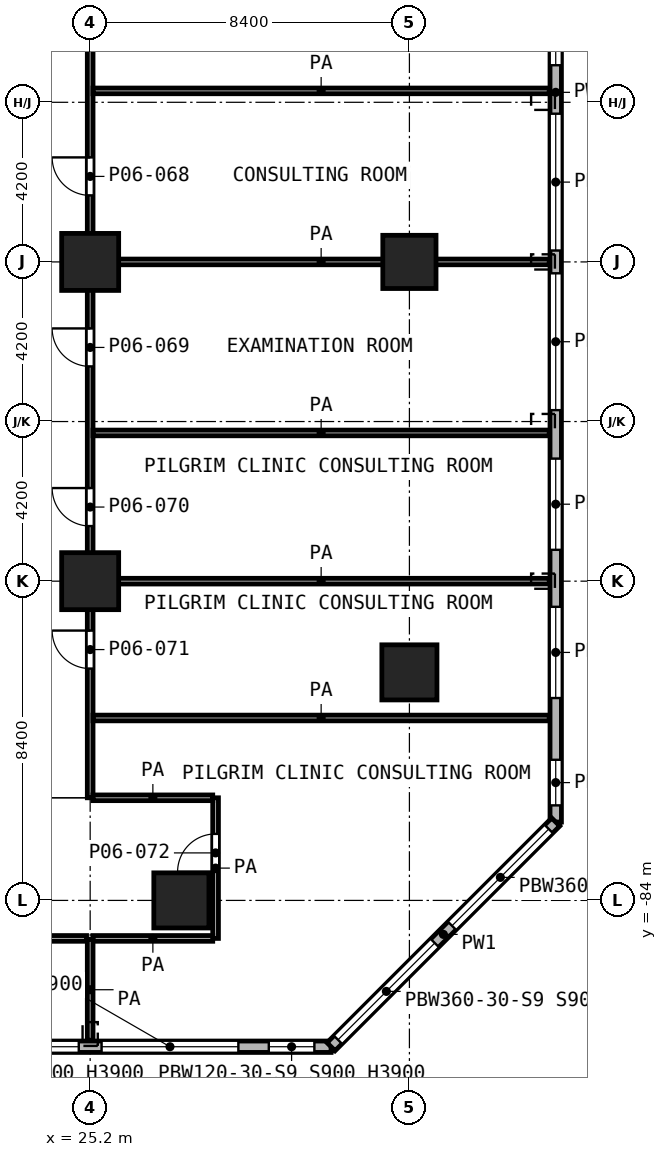
"""IFC4 building model, lengths in metres.
Left out: names, types, materials, properties, quantities, classifications, styles, units other than length and angle.
Written with IfcOpenShell. Run it as: python <this file> out.ifc"""

import sys

from ifc_helpers import new_model, si_unit, direction, frame, frame_2d, origin, origin_2d, place, context, subcontext, project, spatial, rectangle, extrude, element, fill, save


model = new_model("IFC4")
c1 = context("Model", 3, precision=1e-05, world=origin(), true_north=direction((0.0, 1.0)))
c2 = subcontext(c1, "Body", "Model", "MODEL_VIEW")
j1 = project(units=[si_unit("LENGTHUNIT", "METRE"), si_unit("PLANEANGLEUNIT", "RADIAN")], contexts=[c1])
p1 = place(None, origin())
s1 = spatial("IfcSite", under=j1, at=p1, CompositionType="ELEMENT")
p2 = place(p1, origin())
s2 = spatial("IfcBuilding", under=s1, at=p2, CompositionType="ELEMENT")
p3 = place(p2, frame((0.0, 0.0, 29.0)))
s3 = spatial("IfcBuildingStorey", under=s2, at=p3, CompositionType="ELEMENT", Elevation=29.0)
p4 = place(p3, frame((25.2, -67.2, 0.0), z_axis=(0.0, 0.0, 1.0), x_axis=(1.0, 0.0, 0.0)))
e1 = element("IfcColumn", 1, at=p4, inside=s3, PredefinedType="COLUMN", context=c2, shape_type="SweptSolid", body=[
    extrude(rectangle(XDim=1.5, YDim=1.5, at=origin_2d()), origin(), (0.0, 0.0, 1.0), 5.2),
])
p5 = place(p3, frame((33.6, -67.2, 0.0), z_axis=(0.0, 0.0, 1.0), x_axis=(1.0, 0.0, 0.0)))
e2 = element("IfcColumn", 2, at=p5, inside=s3, PredefinedType="COLUMN", context=c2, shape_type="SweptSolid", body=[
    extrude(rectangle(XDim=1.4, YDim=1.4, at=origin_2d()), origin(), (0.0, 0.0, 1.0), 5.2),
])
p6 = place(p3, frame((25.2, -75.6, 0.0), z_axis=(0.0, 0.0, 1.0), x_axis=(1.0, 0.0, 0.0)))
e3 = element("IfcColumn", 3, at=p6, inside=s3, PredefinedType="COLUMN", context=c2, shape_type="SweptSolid", body=[
    extrude(rectangle(XDim=1.5, YDim=1.5, at=origin_2d()), origin(), (0.0, 0.0, 1.0), 5.2),
])
for number, where, z_axis, x_axis in (
    (4, (33.6, -78.0, 0.0), (0.0, 0.0, 1.0), (1.0, 0.0, 0.0)),
    (5, (27.6, -84.0, 0.0), (0.0, 0.0, 1.0), (1.0, 0.0, 0.0)),
):
    element("IfcColumn", number, at=place(p3, frame(where, z_axis=z_axis, x_axis=x_axis)), inside=s3, PredefinedType="COLUMN", context=c2, shape_type="SweptSolid", body=[
        extrude(rectangle(XDim=1.45, YDim=1.45, at=origin_2d()), origin(), (0.0, 0.0, 1.0), 5.2),
    ])
p7 = place(p3, frame((2.062, -87.85, 0.0), z_axis=(0.0, 0.0, 1.0), x_axis=(1.0, 0.0, 0.0)))
e6 = element("IfcWall", 6, at=p7, inside=s3, PredefinedType="SOLIDWALL", context=c2, shape_type="SweptSolid", body=[
    extrude(rectangle(XDim=29.476, YDim=0.3, at=frame_2d((14.738, 0.0))), origin(), (0.0, 0.0, 1.0), 4.7),
])
p8 = place(p7, frame((0.438, 0.0, 0.9)))
e7 = element("IfcOpeningElement", 7, at=p8, cuts=e6, PredefinedType="OPENING", context=c2, shape_type="SweptSolid", body=[
    extrude(rectangle(XDim=1.2, YDim=3.0, at=frame_2d((0.6, 1.5))), frame((0.0, 0.16, 0.0), z_axis=(0.0, -1.0, 0.0), x_axis=(1.0, 0.0, 0.0)), (0.0, 0.0, 1.0), 0.32),
])
p9 = place(p7, frame((2.438, 0.0, 0.9)))
e8 = element("IfcOpeningElement", 8, at=p9, cuts=e6, PredefinedType="OPENING", context=c2, shape_type="SweptSolid", body=[
    extrude(rectangle(XDim=3.6, YDim=3.0, at=frame_2d((1.8, 1.5))), frame((0.0, 0.16, 0.0), z_axis=(0.0, -1.0, 0.0), x_axis=(1.0, 0.0, 0.0)), (0.0, 0.0, 1.0), 0.32),
])
p10 = place(p7, frame((7.163, 0.0, 0.9)))
e9 = element("IfcOpeningElement", 9, at=p10, cuts=e6, PredefinedType="OPENING", context=c2, shape_type="SweptSolid", body=[
    extrude(rectangle(XDim=1.2, YDim=3.0, at=frame_2d((0.6, 1.5))), frame((0.0, 0.16, 0.0), z_axis=(0.0, -1.0, 0.0), x_axis=(1.0, 0.0, 0.0)), (0.0, 0.0, 1.0), 0.32),
])
p11 = place(p7, frame((10.838, 0.0, 0.9)))
e10 = element("IfcOpeningElement", 10, at=p11, cuts=e6, PredefinedType="OPENING", context=c2, shape_type="SweptSolid", body=[
    extrude(rectangle(XDim=3.6, YDim=3.0, at=frame_2d((1.8, 1.5))), frame((0.0, 0.16, 0.0), z_axis=(0.0, -1.0, 0.0), x_axis=(1.0, 0.0, 0.0)), (0.0, 0.0, 1.0), 0.32),
])
p12 = place(p7, frame((15.038, 0.0, 0.9)))
e11 = element("IfcOpeningElement", 11, at=p12, cuts=e6, PredefinedType="OPENING", context=c2, shape_type="SweptSolid", body=[
    extrude(rectangle(XDim=3.6, YDim=3.0, at=frame_2d((1.8, 1.5))), frame((0.0, 0.16, 0.0), z_axis=(0.0, -1.0, 0.0), x_axis=(1.0, 0.0, 0.0)), (0.0, 0.0, 1.0), 0.32),
])
p13 = place(p7, frame((19.238, 0.0, 0.9)))
e12 = element("IfcOpeningElement", 12, at=p13, cuts=e6, PredefinedType="OPENING", context=c2, shape_type="SweptSolid", body=[
    extrude(rectangle(XDim=3.6, YDim=3.0, at=frame_2d((1.8, 1.5))), frame((0.0, 0.16, 0.0), z_axis=(0.0, -1.0, 0.0), x_axis=(1.0, 0.0, 0.0)), (0.0, 0.0, 1.0), 0.32),
])
p14 = place(p7, frame((23.438, 0.0, 0.9)))
e13 = element("IfcOpeningElement", 13, at=p14, cuts=e6, PredefinedType="OPENING", context=c2, shape_type="SweptSolid", body=[
    extrude(rectangle(XDim=3.6, YDim=3.0, at=frame_2d((1.8, 1.5))), frame((0.0, 0.16, 0.0), z_axis=(0.0, -1.0, 0.0), x_axis=(1.0, 0.0, 0.0)), (0.0, 0.0, 1.0), 0.32),
])
p15 = place(p7, frame((27.838, 0.0, 0.9)))
e14 = element("IfcOpeningElement", 14, at=p15, cuts=e6, PredefinedType="OPENING", context=c2, shape_type="SweptSolid", body=[
    extrude(rectangle(XDim=1.2, YDim=3.0, at=frame_2d((0.6, 1.5))), frame((0.0, 0.16, 0.0), z_axis=(0.0, -1.0, 0.0), x_axis=(1.0, 0.0, 0.0)), (0.0, 0.0, 1.0), 0.32),
])
p16 = place(p3, frame((31.538, -87.85, 0.0), z_axis=(0.0, 0.0, 1.0), x_axis=(0.707106781187, 0.707106781187, 0.0)))
e15 = element("IfcWall", 15, at=p16, inside=s3, PredefinedType="SOLIDWALL", context=c2, shape_type="SweptSolid", body=[
    extrude(rectangle(XDim=8.361, YDim=0.3, at=frame_2d((4.181, 0.0))), origin(), (0.0, 0.0, 1.0), 4.7),
])
p17 = place(p16, frame((0.259, 0.0, 0.9)))
e16 = element("IfcOpeningElement", 16, at=p17, cuts=e15, PredefinedType="OPENING", context=c2, shape_type="SweptSolid", body=[
    extrude(rectangle(XDim=3.6, YDim=3.0, at=frame_2d((1.8, 1.5))), frame((0.0, 0.16, 0.0), z_axis=(0.0, -1.0, 0.0), x_axis=(1.0, 0.0, 0.0)), (0.0, 0.0, 1.0), 0.32),
])
p18 = place(p16, frame((4.502, 0.0, 0.9)))
e17 = element("IfcOpeningElement", 17, at=p18, cuts=e15, PredefinedType="OPENING", context=c2, shape_type="SweptSolid", body=[
    extrude(rectangle(XDim=3.6, YDim=3.0, at=frame_2d((1.8, 1.5))), frame((0.0, 0.16, 0.0), z_axis=(0.0, -1.0, 0.0), x_axis=(1.0, 0.0, 0.0)), (0.0, 0.0, 1.0), 0.32),
])
p19 = place(p3, frame((37.45, -81.938, 0.0), z_axis=(0.0, 0.0, 1.0), x_axis=(0.0, 1.0, 0.0)))
e18 = element("IfcWall", 18, at=p19, inside=s3, PredefinedType="SOLIDWALL", context=c2, shape_type="SweptSolid", body=[
    extrude(rectangle(XDim=38.4, YDim=0.3, at=frame_2d((19.2, 0.0))), origin(), (0.0, 0.0, 1.0), 4.7),
])
p20 = place(p19, frame((0.438, 0.0, 0.9)))
e19 = element("IfcOpeningElement", 19, at=p20, cuts=e18, PredefinedType="OPENING", context=c2, shape_type="SweptSolid", body=[
    extrude(rectangle(XDim=1.2, YDim=3.0, at=frame_2d((0.6, 1.5))), frame((0.0, 0.16, 0.0), z_axis=(0.0, -1.0, 0.0), x_axis=(1.0, 0.0, 0.0)), (0.0, 0.0, 1.0), 0.32),
])
p21 = place(p19, frame((3.263, 0.0, 0.9)))
e20 = element("IfcOpeningElement", 20, at=p21, cuts=e18, PredefinedType="OPENING", context=c2, shape_type="SweptSolid", body=[
    extrude(rectangle(XDim=2.4, YDim=3.0, at=frame_2d((1.2, 1.5))), frame((0.0, 0.16, 0.0), z_axis=(0.0, -1.0, 0.0), x_axis=(1.0, 0.0, 0.0)), (0.0, 0.0, 1.0), 0.32),
])
p22 = place(p19, frame((7.163, 0.0, 0.9)))
e21 = element("IfcOpeningElement", 21, at=p22, cuts=e18, PredefinedType="OPENING", context=c2, shape_type="SweptSolid", body=[
    extrude(rectangle(XDim=2.4, YDim=3.0, at=frame_2d((1.2, 1.5))), frame((0.0, 0.16, 0.0), z_axis=(0.0, -1.0, 0.0), x_axis=(1.0, 0.0, 0.0)), (0.0, 0.0, 1.0), 0.32),
])
p23 = place(p19, frame((10.838, 0.0, 0.9)))
e22 = element("IfcOpeningElement", 22, at=p23, cuts=e18, PredefinedType="OPENING", context=c2, shape_type="SweptSolid", body=[
    extrude(rectangle(XDim=3.6, YDim=3.0, at=frame_2d((1.8, 1.5))), frame((0.0, 0.16, 0.0), z_axis=(0.0, -1.0, 0.0), x_axis=(1.0, 0.0, 0.0)), (0.0, 0.0, 1.0), 0.32),
])
p24 = place(p19, frame((15.038, 0.0, 0.9)))
e23 = element("IfcOpeningElement", 23, at=p24, cuts=e18, PredefinedType="OPENING", context=c2, shape_type="SweptSolid", body=[
    extrude(rectangle(XDim=3.6, YDim=3.0, at=frame_2d((1.8, 1.5))), frame((0.0, 0.16, 0.0), z_axis=(0.0, -1.0, 0.0), x_axis=(1.0, 0.0, 0.0)), (0.0, 0.0, 1.0), 0.32),
])
p25 = place(p19, frame((19.913, 0.0, 0.9)))
e24 = element("IfcOpeningElement", 24, at=p25, cuts=e18, PredefinedType="OPENING", context=c2, shape_type="SweptSolid", body=[
    extrude(rectangle(XDim=2.4, YDim=3.0, at=frame_2d((1.2, 1.5))), frame((0.0, 0.16, 0.0), z_axis=(0.0, -1.0, 0.0), x_axis=(1.0, 0.0, 0.0)), (0.0, 0.0, 1.0), 0.32),
])
p26 = place(p19, frame((23.813, 0.0, 0.9)))
e25 = element("IfcOpeningElement", 25, at=p26, cuts=e18, PredefinedType="OPENING", context=c2, shape_type="SweptSolid", body=[
    extrude(rectangle(XDim=2.4, YDim=3.0, at=frame_2d((1.2, 1.5))), frame((0.0, 0.16, 0.0), z_axis=(0.0, -1.0, 0.0), x_axis=(1.0, 0.0, 0.0)), (0.0, 0.0, 1.0), 0.32),
])
p27 = place(p19, frame((27.638, 0.0, 0.9)))
e26 = element("IfcOpeningElement", 26, at=p27, cuts=e18, PredefinedType="OPENING", context=c2, shape_type="SweptSolid", body=[
    extrude(rectangle(XDim=3.6, YDim=3.0, at=frame_2d((1.8, 1.5))), frame((0.0, 0.16, 0.0), z_axis=(0.0, -1.0, 0.0), x_axis=(1.0, 0.0, 0.0)), (0.0, 0.0, 1.0), 0.32),
])
p28 = place(p19, frame((31.838, 0.0, 0.9)))
e27 = element("IfcOpeningElement", 27, at=p28, cuts=e18, PredefinedType="OPENING", context=c2, shape_type="SweptSolid", body=[
    extrude(rectangle(XDim=3.6, YDim=3.0, at=frame_2d((1.8, 1.5))), frame((0.0, 0.16, 0.0), z_axis=(0.0, -1.0, 0.0), x_axis=(1.0, 0.0, 0.0)), (0.0, 0.0, 1.0), 0.32),
])
p29 = place(p19, frame((36.438, 0.0, 0.9)))
e28 = element("IfcOpeningElement", 28, at=p29, cuts=e18, PredefinedType="OPENING", context=c2, shape_type="SweptSolid", body=[
    extrude(rectangle(XDim=1.2, YDim=3.0, at=frame_2d((0.6, 1.5))), frame((0.0, 0.16, 0.0), z_axis=(0.0, -1.0, 0.0), x_axis=(1.0, 0.0, 0.0)), (0.0, 0.0, 1.0), 0.32),
])
p30 = place(p3, frame((11.195, -85.0, 0.0), z_axis=(0.0, 0.0, 1.0), x_axis=(1.0, 0.0, 0.0)))
e29 = element("IfcWall", 29, at=p30, inside=s3, PredefinedType="PARTITIONING", context=c2, shape_type="SweptSolid", body=[
    extrude(rectangle(XDim=13.91, YDim=0.15, at=frame_2d((6.955, 0.0))), origin(), (0.0, 0.0, 1.0), 4.7),
])
p31 = place(p30, frame((6.455, 0.0, 0.0)))
e30 = element("IfcOpeningElement", 30, at=p31, cuts=e29, PredefinedType="OPENING", context=c2, shape_type="SweptSolid", body=[
    extrude(rectangle(XDim=1.0, YDim=2.1, at=frame_2d((0.5, 1.05))), frame((0.0, 0.085, 0.0), z_axis=(0.0, -1.0, 0.0), x_axis=(1.0, 0.0, 0.0)), (0.0, 0.0, 1.0), 0.17),
])
for number, where, z_axis, x_axis in (
    (31, (25.275, -85.0, 0.0), (0.0, 0.0, 1.0), (1.0, 0.0, 0.0)),
    (32, (25.275, -81.3, 0.0), (0.0, 0.0, 1.0), (1.0, 0.0, 0.0)),
):
    element("IfcWall", number, at=place(p3, frame(where, z_axis=z_axis, x_axis=x_axis)), inside=s3, PredefinedType="PARTITIONING", context=c2, shape_type="SweptSolid", body=[
        extrude(rectangle(XDim=3.15, YDim=0.15, at=frame_2d((1.575, 0.0))), origin(), (0.0, 0.0, 1.0), 4.7),
    ])
for number, where, z_axis, x_axis in (
    (33, (25.275, -79.2, 0.0), (0.0, 0.0, 1.0), (1.0, 0.0, 0.0)),
    (34, (25.275, -75.6, 0.0), (0.0, 0.0, 1.0), (1.0, 0.0, 0.0)),
    (35, (25.275, -71.7, 0.0), (0.0, 0.0, 1.0), (1.0, 0.0, 0.0)),
    (36, (25.275, -67.2, 0.0), (0.0, 0.0, 1.0), (1.0, 0.0, 0.0)),
    (37, (25.275, -62.7, 0.0), (0.0, 0.0, 1.0), (1.0, 0.0, 0.0)),
):
    element("IfcWall", number, at=place(p3, frame(where, z_axis=z_axis, x_axis=x_axis)), inside=s3, PredefinedType="PARTITIONING", context=c2, shape_type="SweptSolid", body=[
        extrude(rectangle(XDim=12.005, YDim=0.15, at=frame_2d((6.002, 0.0))), origin(), (0.0, 0.0, 1.0), 4.7),
    ])
p32 = place(p3, frame((25.2, -87.68, 0.0), z_axis=(0.0, 0.0, 1.0), x_axis=(0.0, 1.0, 0.0)))
e38 = element("IfcWall", 38, at=p32, inside=s3, PredefinedType="PARTITIONING", context=c2, shape_type="SweptSolid", body=[
    extrude(rectangle(XDim=2.66, YDim=0.15, at=frame_2d((1.33, 0.0))), origin(), (0.0, 0.0, 1.0), 4.7),
])
p33 = place(p3, frame((25.2, -81.3, 0.0), z_axis=(0.0, 0.0, 1.0), x_axis=(0.0, 1.0, 0.0)))
e39 = element("IfcWall", 39, at=p33, inside=s3, PredefinedType="PARTITIONING", context=c2, shape_type="SweptSolid", body=[
    extrude(rectangle(XDim=46.95, YDim=0.15, at=frame_2d((23.475, 0.0))), origin(), (0.0, 0.0, 1.0), 4.7),
])
p34 = place(p33, frame((35.55, 0.0, 0.0)))
e40 = element("IfcOpeningElement", 40, at=p34, cuts=e39, PredefinedType="OPENING", context=c2, shape_type="SweptSolid", body=[
    extrude(rectangle(XDim=1.5, YDim=2.1, at=frame_2d((0.75, 1.05))), frame((0.0, 0.085, 0.0), z_axis=(0.0, -1.0, 0.0), x_axis=(1.0, 0.0, 0.0)), (0.0, 0.0, 1.0), 0.17),
])
p35 = place(p33, frame((28.0, 0.0, 0.0)))
e41 = element("IfcOpeningElement", 41, at=p35, cuts=e39, PredefinedType="OPENING", context=c2, shape_type="SweptSolid", body=[
    extrude(rectangle(XDim=1.0, YDim=2.1, at=frame_2d((0.5, 1.05))), frame((0.0, 0.085, 0.0), z_axis=(0.0, -1.0, 0.0), x_axis=(1.0, 0.0, 0.0)), (0.0, 0.0, 1.0), 0.17),
])
p36 = place(p33, frame((23.8, 0.0, 0.0)))
e42 = element("IfcOpeningElement", 42, at=p36, cuts=e39, PredefinedType="OPENING", context=c2, shape_type="SweptSolid", body=[
    extrude(rectangle(XDim=1.0, YDim=2.1, at=frame_2d((0.5, 1.05))), frame((0.0, 0.085, 0.0), z_axis=(0.0, -1.0, 0.0), x_axis=(1.0, 0.0, 0.0)), (0.0, 0.0, 1.0), 0.17),
])
p37 = place(p33, frame((20.05, 0.0, 0.0)))
e43 = element("IfcOpeningElement", 43, at=p37, cuts=e39, PredefinedType="OPENING", context=c2, shape_type="SweptSolid", body=[
    extrude(rectangle(XDim=1.0, YDim=2.1, at=frame_2d((0.5, 1.05))), frame((0.0, 0.085, 0.0), z_axis=(0.0, -1.0, 0.0), x_axis=(1.0, 0.0, 0.0)), (0.0, 0.0, 1.0), 0.17),
])
p38 = place(p33, frame((15.85, 0.0, 0.0)))
e44 = element("IfcOpeningElement", 44, at=p38, cuts=e39, PredefinedType="OPENING", context=c2, shape_type="SweptSolid", body=[
    extrude(rectangle(XDim=1.0, YDim=2.1, at=frame_2d((0.5, 1.05))), frame((0.0, 0.085, 0.0), z_axis=(0.0, -1.0, 0.0), x_axis=(1.0, 0.0, 0.0)), (0.0, 0.0, 1.0), 0.17),
])
p39 = place(p33, frame((11.35, 0.0, 0.0)))
e45 = element("IfcOpeningElement", 45, at=p39, cuts=e39, PredefinedType="OPENING", context=c2, shape_type="SweptSolid", body=[
    extrude(rectangle(XDim=1.0, YDim=2.1, at=frame_2d((0.5, 1.05))), frame((0.0, 0.085, 0.0), z_axis=(0.0, -1.0, 0.0), x_axis=(1.0, 0.0, 0.0)), (0.0, 0.0, 1.0), 0.17),
])
p40 = place(p33, frame((7.15, 0.0, 0.0)))
e46 = element("IfcOpeningElement", 46, at=p40, cuts=e39, PredefinedType="OPENING", context=c2, shape_type="SweptSolid", body=[
    extrude(rectangle(XDim=1.0, YDim=2.1, at=frame_2d((0.5, 1.05))), frame((0.0, 0.085, 0.0), z_axis=(0.0, -1.0, 0.0), x_axis=(1.0, 0.0, 0.0)), (0.0, 0.0, 1.0), 0.17),
])
p41 = place(p33, frame((3.4, 0.0, 0.0)))
e47 = element("IfcOpeningElement", 47, at=p41, cuts=e39, PredefinedType="OPENING", context=c2, shape_type="SweptSolid", body=[
    extrude(rectangle(XDim=1.0, YDim=2.1, at=frame_2d((0.5, 1.05))), frame((0.0, 0.085, 0.0), z_axis=(0.0, -1.0, 0.0), x_axis=(1.0, 0.0, 0.0)), (0.0, 0.0, 1.0), 0.17),
])
p42 = place(p3, frame((28.5, -85.0, 0.0), z_axis=(0.0, 0.0, 1.0), x_axis=(0.0, 1.0, 0.0)))
e48 = element("IfcWall", 48, at=p42, inside=s3, PredefinedType="PARTITIONING", context=c2, shape_type="SweptSolid", body=[
    extrude(rectangle(XDim=3.7, YDim=0.15, at=frame_2d((1.85, 0.0))), origin(), (0.0, 0.0, 1.0), 4.7),
])
p43 = place(p42, frame((1.75, 0.0, 0.0)))
e49 = element("IfcOpeningElement", 49, at=p43, cuts=e48, PredefinedType="OPENING", context=c2, shape_type="SweptSolid", body=[
    extrude(rectangle(XDim=1.0, YDim=2.1, at=frame_2d((0.5, 1.05))), frame((0.0, 0.085, 0.0), z_axis=(0.0, -1.0, 0.0), x_axis=(1.0, 0.0, 0.0)), (0.0, 0.0, 1.0), 0.17),
])
p44 = place(p13, origin())
e50 = element("IfcWindow", 50, at=p44, inside=s3, PartitioningType="SINGLE_PANEL", PredefinedType="WINDOW", context=c2, shape_type="SweptSolid", body=[
    extrude(rectangle(XDim=3.6, YDim=3.0, at=frame_2d((1.8, 1.5))), frame((0.0, 0.03, 0.0), z_axis=(0.0, -1.0, 0.0), x_axis=(1.0, 0.0, 0.0)), (0.0, 0.0, 1.0), 0.06),
])
fill(e12, e50)
p45 = place(p14, origin())
e51 = element("IfcWindow", 51, at=p45, inside=s3, PartitioningType="SINGLE_PANEL", PredefinedType="WINDOW", context=c2, shape_type="SweptSolid", body=[
    extrude(rectangle(XDim=3.6, YDim=3.0, at=frame_2d((1.8, 1.5))), frame((0.0, 0.03, 0.0), z_axis=(0.0, -1.0, 0.0), x_axis=(1.0, 0.0, 0.0)), (0.0, 0.0, 1.0), 0.06),
])
fill(e13, e51)
p46 = place(p15, origin())
e52 = element("IfcWindow", 52, at=p46, inside=s3, PartitioningType="SINGLE_PANEL", PredefinedType="WINDOW", context=c2, shape_type="SweptSolid", body=[
    extrude(rectangle(XDim=1.2, YDim=3.0, at=frame_2d((0.6, 1.5))), frame((0.0, 0.03, 0.0), z_axis=(0.0, -1.0, 0.0), x_axis=(1.0, 0.0, 0.0)), (0.0, 0.0, 1.0), 0.06),
])
fill(e14, e52)
p47 = place(p17, origin())
e53 = element("IfcWindow", 53, at=p47, inside=s3, PartitioningType="SINGLE_PANEL", PredefinedType="WINDOW", context=c2, shape_type="SweptSolid", body=[
    extrude(rectangle(XDim=3.6, YDim=3.0, at=frame_2d((1.8, 1.5))), frame((0.0, 0.03, 0.0), z_axis=(0.0, -1.0, 0.0), x_axis=(1.0, 0.0, 0.0)), (0.0, 0.0, 1.0), 0.06),
])
fill(e16, e53)
p48 = place(p18, origin())
e54 = element("IfcWindow", 54, at=p48, inside=s3, PartitioningType="SINGLE_PANEL", PredefinedType="WINDOW", context=c2, shape_type="SweptSolid", body=[
    extrude(rectangle(XDim=3.6, YDim=3.0, at=frame_2d((1.8, 1.5))), frame((0.0, 0.03, 0.0), z_axis=(0.0, -1.0, 0.0), x_axis=(1.0, 0.0, 0.0)), (0.0, 0.0, 1.0), 0.06),
])
fill(e17, e54)
p49 = place(p20, origin())
e55 = element("IfcWindow", 55, at=p49, inside=s3, PartitioningType="SINGLE_PANEL", PredefinedType="WINDOW", context=c2, shape_type="SweptSolid", body=[
    extrude(rectangle(XDim=1.2, YDim=3.0, at=frame_2d((0.6, 1.5))), frame((0.0, 0.03, 0.0), z_axis=(0.0, -1.0, 0.0), x_axis=(1.0, 0.0, 0.0)), (0.0, 0.0, 1.0), 0.06),
])
fill(e19, e55)
p50 = place(p21, origin())
e56 = element("IfcWindow", 56, at=p50, inside=s3, PartitioningType="SINGLE_PANEL", PredefinedType="WINDOW", context=c2, shape_type="SweptSolid", body=[
    extrude(rectangle(XDim=2.4, YDim=3.0, at=frame_2d((1.2, 1.5))), frame((0.0, 0.03, 0.0), z_axis=(0.0, -1.0, 0.0), x_axis=(1.0, 0.0, 0.0)), (0.0, 0.0, 1.0), 0.06),
])
fill(e20, e56)
p51 = place(p22, origin())
e57 = element("IfcWindow", 57, at=p51, inside=s3, PartitioningType="SINGLE_PANEL", PredefinedType="WINDOW", context=c2, shape_type="SweptSolid", body=[
    extrude(rectangle(XDim=2.4, YDim=3.0, at=frame_2d((1.2, 1.5))), frame((0.0, 0.03, 0.0), z_axis=(0.0, -1.0, 0.0), x_axis=(1.0, 0.0, 0.0)), (0.0, 0.0, 1.0), 0.06),
])
fill(e21, e57)
p52 = place(p23, origin())
e58 = element("IfcWindow", 58, at=p52, inside=s3, PartitioningType="SINGLE_PANEL", PredefinedType="WINDOW", context=c2, shape_type="SweptSolid", body=[
    extrude(rectangle(XDim=3.6, YDim=3.0, at=frame_2d((1.8, 1.5))), frame((0.0, 0.03, 0.0), z_axis=(0.0, -1.0, 0.0), x_axis=(1.0, 0.0, 0.0)), (0.0, 0.0, 1.0), 0.06),
])
fill(e22, e58)
p53 = place(p24, origin())
e59 = element("IfcWindow", 59, at=p53, inside=s3, PartitioningType="SINGLE_PANEL", PredefinedType="WINDOW", context=c2, shape_type="SweptSolid", body=[
    extrude(rectangle(XDim=3.6, YDim=3.0, at=frame_2d((1.8, 1.5))), frame((0.0, 0.03, 0.0), z_axis=(0.0, -1.0, 0.0), x_axis=(1.0, 0.0, 0.0)), (0.0, 0.0, 1.0), 0.06),
])
fill(e23, e59)
p54 = place(p25, origin())
e60 = element("IfcWindow", 60, at=p54, inside=s3, PartitioningType="SINGLE_PANEL", PredefinedType="WINDOW", context=c2, shape_type="SweptSolid", body=[
    extrude(rectangle(XDim=2.4, YDim=3.0, at=frame_2d((1.2, 1.5))), frame((0.0, 0.03, 0.0), z_axis=(0.0, -1.0, 0.0), x_axis=(1.0, 0.0, 0.0)), (0.0, 0.0, 1.0), 0.06),
])
fill(e24, e60)
p55 = place(p38, origin())
e61 = element("IfcDoor", 61, at=p55, inside=s3, OperationType="SINGLE_SWING_RIGHT", PredefinedType="DOOR", context=c2, shape_type="SweptSolid", body=[
    extrude(rectangle(XDim=1.0, YDim=2.1, at=frame_2d((0.5, 1.05))), frame((0.0, 0.025, 0.0), z_axis=(0.0, -1.0, 0.0), x_axis=(1.0, 0.0, 0.0)), (0.0, 0.0, 1.0), 0.05),
])
fill(e44, e61)
p56 = place(p39, origin())
e62 = element("IfcDoor", 62, at=p56, inside=s3, OperationType="SINGLE_SWING_RIGHT", PredefinedType="DOOR", context=c2, shape_type="SweptSolid", body=[
    extrude(rectangle(XDim=1.0, YDim=2.1, at=frame_2d((0.5, 1.05))), frame((0.0, 0.025, 0.0), z_axis=(0.0, -1.0, 0.0), x_axis=(1.0, 0.0, 0.0)), (0.0, 0.0, 1.0), 0.05),
])
fill(e45, e62)
p57 = place(p40, origin())
e63 = element("IfcDoor", 63, at=p57, inside=s3, OperationType="SINGLE_SWING_RIGHT", PredefinedType="DOOR", context=c2, shape_type="SweptSolid", body=[
    extrude(rectangle(XDim=1.0, YDim=2.1, at=frame_2d((0.5, 1.05))), frame((0.0, 0.025, 0.0), z_axis=(0.0, -1.0, 0.0), x_axis=(1.0, 0.0, 0.0)), (0.0, 0.0, 1.0), 0.05),
])
fill(e46, e63)
p58 = place(p41, origin())
e64 = element("IfcDoor", 64, at=p58, inside=s3, OperationType="SINGLE_SWING_RIGHT", PredefinedType="DOOR", context=c2, shape_type="SweptSolid", body=[
    extrude(rectangle(XDim=1.0, YDim=2.1, at=frame_2d((0.5, 1.05))), frame((0.0, 0.025, 0.0), z_axis=(0.0, -1.0, 0.0), x_axis=(1.0, 0.0, 0.0)), (0.0, 0.0, 1.0), 0.05),
])
fill(e47, e64)
p59 = place(p43, origin())
e65 = element("IfcDoor", 65, at=p59, inside=s3, OperationType="SINGLE_SWING_LEFT", PredefinedType="DOOR", context=c2, shape_type="SweptSolid", body=[
    extrude(rectangle(XDim=1.0, YDim=2.1, at=frame_2d((0.5, 1.05))), frame((0.0, 0.025, 0.0), z_axis=(0.0, -1.0, 0.0), x_axis=(1.0, 0.0, 0.0)), (0.0, 0.0, 1.0), 0.05),
])
fill(e49, e65)
save(model, sys.argv[1])
